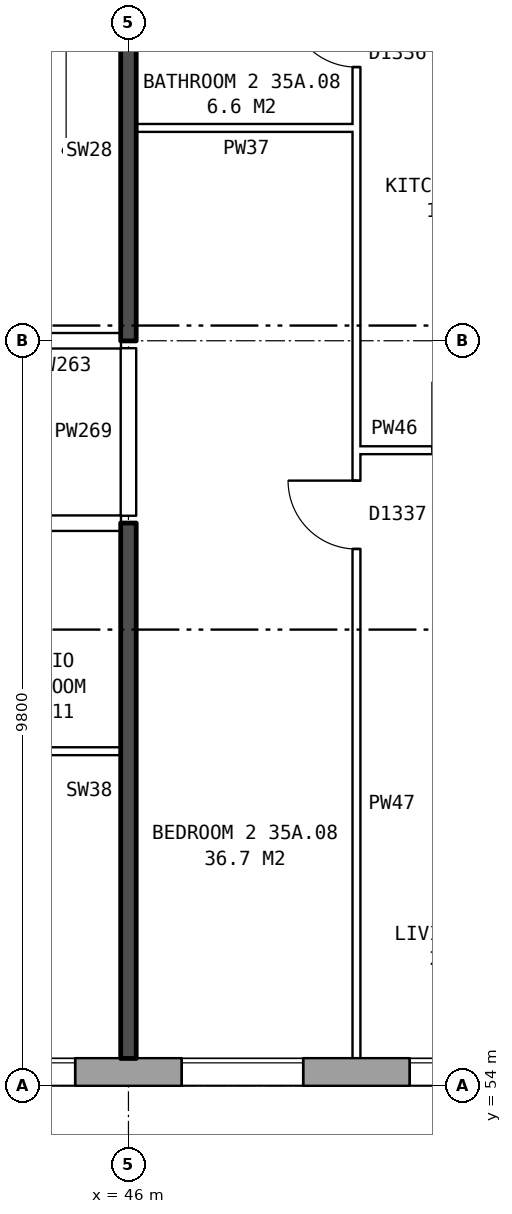
"""IFC4 building model, lengths in metres.
Left out: names, types, materials, properties, quantities, classifications, styles, units other than length and angle.
Written with IfcOpenShell. Run it as: python <this file> out.ifc"""

import sys

from ifc_helpers import new_model, si_unit, direction, frame, frame_2d, origin, place, context, subcontext, project, spatial, rectangle, extrude, element, fill, save


model = new_model("IFC4")
c1 = context("Model", 3, precision=1e-05, world=origin(), true_north=direction((0.0, 1.0)))
c2 = subcontext(c1, "Body", "Model", "MODEL_VIEW")
j1 = project(units=[si_unit("LENGTHUNIT", "METRE"), si_unit("PLANEANGLEUNIT", "RADIAN")], contexts=[c1])
p1 = place(None, origin())
s1 = spatial("IfcSite", under=j1, at=p1, CompositionType="ELEMENT")
p2 = place(p1, origin())
s2 = spatial("IfcBuilding", under=s1, at=p2, CompositionType="ELEMENT")
p3 = place(p2, frame((0.0, 0.0, 126.8)))
s3 = spatial("IfcBuildingStorey", under=s2, at=p3, CompositionType="ELEMENT", Elevation=126.8)
p4 = place(p3, frame((29.825, 54.18, 0.0), z_axis=(0.0, 0.0, 1.0), x_axis=(1.0, 0.0, 0.0)))
e1 = element("IfcWall", 1, at=p4, inside=s3, PredefinedType="STANDARD", context=c2, shape_type="SweptSolid", body=[
    extrude(rectangle(XDim=43.101, YDim=0.36, at=frame_2d((21.55, 0.0))), origin(), (0.0, 0.0, 1.0), 2.85),
])
p5 = place(p4, frame((1.875, 0.0, 0.8)))
e2 = element("IfcOpeningElement", 2, at=p5, cuts=e1, PredefinedType="OPENING", context=c2, shape_type="SweptSolid", body=[
    extrude(rectangle(XDim=1.6, YDim=1.8, at=frame_2d((0.8, 0.9))), frame((0.0, 0.19, 0.0), z_axis=(0.0, -1.0, 0.0), x_axis=(1.0, 0.0, 0.0)), (0.0, 0.0, 1.0), 0.38),
])
p6 = place(p4, frame((4.375, 0.0, 0.8)))
e3 = element("IfcOpeningElement", 3, at=p6, cuts=e1, PredefinedType="OPENING", context=c2, shape_type="SweptSolid", body=[
    extrude(rectangle(XDim=1.0, YDim=1.8, at=frame_2d((0.5, 0.9))), frame((0.0, 0.19, 0.0), z_axis=(0.0, -1.0, 0.0), x_axis=(1.0, 0.0, 0.0)), (0.0, 0.0, 1.0), 0.38),
])
p7 = place(p4, frame((5.675, 0.0, 1.6)))
e4 = element("IfcOpeningElement", 4, at=p7, cuts=e1, PredefinedType="OPENING", context=c2, shape_type="SweptSolid", body=[
    extrude(rectangle(XDim=0.6, YDim=0.9, at=frame_2d((0.3, 0.45))), frame((0.0, 0.19, 0.0), z_axis=(0.0, -1.0, 0.0), x_axis=(1.0, 0.0, 0.0)), (0.0, 0.0, 1.0), 0.38),
])
p8 = place(p4, frame((10.875, 0.0, 0.8)))
e5 = element("IfcOpeningElement", 5, at=p8, cuts=e1, PredefinedType="OPENING", context=c2, shape_type="SweptSolid", body=[
    extrude(rectangle(XDim=1.6, YDim=1.8, at=frame_2d((0.8, 0.9))), frame((0.0, 0.19, 0.0), z_axis=(0.0, -1.0, 0.0), x_axis=(1.0, 0.0, 0.0)), (0.0, 0.0, 1.0), 0.38),
])
p9 = place(p4, frame((13.875, 0.0, 0.8)))
e6 = element("IfcOpeningElement", 6, at=p9, cuts=e1, PredefinedType="OPENING", context=c2, shape_type="SweptSolid", body=[
    extrude(rectangle(XDim=1.6, YDim=1.8, at=frame_2d((0.8, 0.9))), frame((0.0, 0.19, 0.0), z_axis=(0.0, -1.0, 0.0), x_axis=(1.0, 0.0, 0.0)), (0.0, 0.0, 1.0), 0.38),
])
p10 = place(p4, frame((16.875, 0.0, 0.8)))
e7 = element("IfcOpeningElement", 7, at=p10, cuts=e1, PredefinedType="OPENING", context=c2, shape_type="SweptSolid", body=[
    extrude(rectangle(XDim=1.6, YDim=1.8, at=frame_2d((0.8, 0.9))), frame((0.0, 0.19, 0.0), z_axis=(0.0, -1.0, 0.0), x_axis=(1.0, 0.0, 0.0)), (0.0, 0.0, 1.0), 0.38),
])
p11 = place(p4, frame((19.875, 0.0, 0.8)))
e8 = element("IfcOpeningElement", 8, at=p11, cuts=e1, PredefinedType="OPENING", context=c2, shape_type="SweptSolid", body=[
    extrude(rectangle(XDim=1.6, YDim=1.8, at=frame_2d((0.8, 0.9))), frame((0.0, 0.19, 0.0), z_axis=(0.0, -1.0, 0.0), x_axis=(1.0, 0.0, 0.0)), (0.0, 0.0, 1.0), 0.38),
])
p12 = place(p4, frame((22.875, 0.0, 0.8)))
e9 = element("IfcOpeningElement", 9, at=p12, cuts=e1, PredefinedType="OPENING", context=c2, shape_type="SweptSolid", body=[
    extrude(rectangle(XDim=1.6, YDim=1.8, at=frame_2d((0.8, 0.9))), frame((0.0, 0.19, 0.0), z_axis=(0.0, -1.0, 0.0), x_axis=(1.0, 0.0, 0.0)), (0.0, 0.0, 1.0), 0.38),
])
p13 = place(p4, frame((25.875, 0.0, 0.8)))
e10 = element("IfcOpeningElement", 10, at=p13, cuts=e1, PredefinedType="OPENING", context=c2, shape_type="SweptSolid", body=[
    extrude(rectangle(XDim=1.6, YDim=1.8, at=frame_2d((0.8, 0.9))), frame((0.0, 0.19, 0.0), z_axis=(0.0, -1.0, 0.0), x_axis=(1.0, 0.0, 0.0)), (0.0, 0.0, 1.0), 0.38),
])
p14 = place(p4, frame((28.875, 0.0, 0.8)))
e11 = element("IfcOpeningElement", 11, at=p14, cuts=e1, PredefinedType="OPENING", context=c2, shape_type="SweptSolid", body=[
    extrude(rectangle(XDim=1.6, YDim=1.8, at=frame_2d((0.8, 0.9))), frame((0.0, 0.19, 0.0), z_axis=(0.0, -1.0, 0.0), x_axis=(1.0, 0.0, 0.0)), (0.0, 0.0, 1.0), 0.38),
])
p15 = place(p4, frame((31.875, 0.0, 0.8)))
e12 = element("IfcOpeningElement", 12, at=p15, cuts=e1, PredefinedType="OPENING", context=c2, shape_type="SweptSolid", body=[
    extrude(rectangle(XDim=1.6, YDim=1.8, at=frame_2d((0.8, 0.9))), frame((0.0, 0.19, 0.0), z_axis=(0.0, -1.0, 0.0), x_axis=(1.0, 0.0, 0.0)), (0.0, 0.0, 1.0), 0.38),
])
p16 = place(p4, frame((34.375, 0.0, 0.8)))
e13 = element("IfcOpeningElement", 13, at=p16, cuts=e1, PredefinedType="OPENING", context=c2, shape_type="SweptSolid", body=[
    extrude(rectangle(XDim=1.2, YDim=0.9, at=frame_2d((0.6, 0.45))), frame((0.0, 0.19, 0.0), z_axis=(0.0, -1.0, 0.0), x_axis=(1.0, 0.0, 0.0)), (0.0, 0.0, 1.0), 0.38),
])
p17 = place(p4, frame((37.875, 0.0, 0.8)))
e14 = element("IfcOpeningElement", 14, at=p17, cuts=e1, PredefinedType="OPENING", context=c2, shape_type="SweptSolid", body=[
    extrude(rectangle(XDim=1.6, YDim=1.8, at=frame_2d((0.8, 0.9))), frame((0.0, 0.19, 0.0), z_axis=(0.0, -1.0, 0.0), x_axis=(1.0, 0.0, 0.0)), (0.0, 0.0, 1.0), 0.38),
])
p18 = place(p4, frame((40.875, 0.0, 0.8)))
e15 = element("IfcOpeningElement", 15, at=p18, cuts=e1, PredefinedType="OPENING", context=c2, shape_type="SweptSolid", body=[
    extrude(rectangle(XDim=1.6, YDim=1.8, at=frame_2d((0.8, 0.9))), frame((0.0, 0.19, 0.0), z_axis=(0.0, -1.0, 0.0), x_axis=(1.0, 0.0, 0.0)), (0.0, 0.0, 1.0), 0.38),
])
p19 = place(p4, frame((7.525, 0.0, 0.8)))
e16 = element("IfcOpeningElement", 16, at=p19, cuts=e1, PredefinedType="OPENING", context=c2, shape_type="SweptSolid", body=[
    extrude(rectangle(XDim=0.6, YDim=0.9, at=frame_2d((0.3, 0.45))), frame((0.0, 0.19, 0.0), z_axis=(0.0, -1.0, 0.0), x_axis=(1.0, 0.0, 0.0)), (0.0, 0.0, 1.0), 0.38),
])
p20 = place(p4, frame((8.525, 0.0, 0.8)))
e17 = element("IfcOpeningElement", 17, at=p20, cuts=e1, PredefinedType="OPENING", context=c2, shape_type="SweptSolid", body=[
    extrude(rectangle(XDim=1.4, YDim=1.8, at=frame_2d((0.7, 0.9))), frame((0.0, 0.19, 0.0), z_axis=(0.0, -1.0, 0.0), x_axis=(1.0, 0.0, 0.0)), (0.0, 0.0, 1.0), 0.38),
])
p21 = place(p4, frame((36.725, 0.0, 1.7)))
e18 = element("IfcOpeningElement", 18, at=p21, cuts=e1, PredefinedType="OPENING", context=c2, shape_type="SweptSolid", body=[
    extrude(rectangle(XDim=0.8, YDim=0.9, at=frame_2d((0.4, 0.45))), frame((0.0, 0.19, 0.0), z_axis=(0.0, -1.0, 0.0), x_axis=(1.0, 0.0, 0.0)), (0.0, 0.0, 1.0), 0.38),
])
p22 = place(p3, frame((43.6, 58.4, 0.0), z_axis=(0.0, 0.0, 1.0), x_axis=(1.0, 0.0, 0.0)))
e19 = element("IfcWall", 19, at=p22, inside=s3, PredefinedType="PARTITIONING", context=c2, shape_type="SweptSolid", body=[
    extrude(rectangle(XDim=2.3, YDim=0.1, at=frame_2d((1.15, 0.0))), origin(), (0.0, 0.0, 1.0), 2.85),
])
p23 = place(p3, frame((27.11, 61.4, 0.0), z_axis=(0.0, 0.0, 1.0), x_axis=(1.0, 0.0, 0.0)))
e20 = element("IfcWall", 20, at=p23, inside=s3, PredefinedType="PARTITIONING", context=c2, shape_type="SweptSolid", body=[
    extrude(rectangle(XDim=18.79, YDim=0.2, at=frame_2d((9.395, 0.0))), origin(), (0.0, 0.0, 1.0), 2.85),
])
p24 = place(p23, frame((14.19, 0.0, 0.0)))
e21 = element("IfcOpeningElement", 21, at=p24, cuts=e20, PredefinedType="OPENING", context=c2, shape_type="SweptSolid", body=[
    extrude(rectangle(XDim=1.0, YDim=2.1, at=frame_2d((0.5, 1.05))), frame((0.0, 0.11, 0.0), z_axis=(0.0, -1.0, 0.0), x_axis=(1.0, 0.0, 0.0)), (0.0, 0.0, 1.0), 0.22),
])
p25 = place(p23, frame((8.19, 0.0, 0.0)))
e22 = element("IfcOpeningElement", 22, at=p25, cuts=e20, PredefinedType="OPENING", context=c2, shape_type="SweptSolid", body=[
    extrude(rectangle(XDim=1.0, YDim=2.1, at=frame_2d((0.5, 1.05))), frame((0.0, 0.11, 0.0), z_axis=(0.0, -1.0, 0.0), x_axis=(1.0, 0.0, 0.0)), (0.0, 0.0, 1.0), 0.22),
])
p26 = place(p23, frame((1.745, 0.0, 0.0)))
e23 = element("IfcOpeningElement", 23, at=p26, cuts=e20, PredefinedType="OPENING", context=c2, shape_type="SweptSolid", body=[
    extrude(rectangle(XDim=1.0, YDim=2.1, at=frame_2d((0.5, 1.05))), frame((0.0, 0.11, 0.0), z_axis=(0.0, -1.0, 0.0), x_axis=(1.0, 0.0, 0.0)), (0.0, 0.0, 1.0), 0.22),
])
p27 = place(p3, frame((49.0, 62.36, 0.0), z_axis=(0.0, 0.0, 1.0), x_axis=(1.0, 0.0, 0.0)))
e24 = element("IfcWall", 24, at=p27, inside=s3, PredefinedType="PARTITIONING", context=c2, shape_type="SweptSolid", body=[
    extrude(rectangle(XDim=2.9, YDim=0.1, at=frame_2d((1.45, 0.0))), origin(), (0.0, 0.0, 1.0), 2.85),
])
p28 = place(p27, frame((1.0, 0.0, 0.0)))
e25 = element("IfcOpeningElement", 25, at=p28, cuts=e24, PredefinedType="OPENING", context=c2, shape_type="SweptSolid", body=[
    extrude(rectangle(XDim=0.9, YDim=2.1, at=frame_2d((0.45, 1.05))), frame((0.0, 0.06, 0.0), z_axis=(0.0, -1.0, 0.0), x_axis=(1.0, 0.0, 0.0)), (0.0, 0.0, 1.0), 0.12),
])
p29 = place(p3, frame((44.36, 63.8, 0.0), z_axis=(0.0, 0.0, 1.0), x_axis=(1.0, 0.0, 0.0)))
e26 = element("IfcWall", 26, at=p29, inside=s3, PredefinedType="PARTITIONING", context=c2, shape_type="SweptSolid", body=[
    extrude(rectangle(XDim=1.54, YDim=0.2, at=frame_2d((0.77, 0.0))), origin(), (0.0, 0.0, 1.0), 2.85),
])
p30 = place(p3, frame((46.1, 66.6, 0.0), z_axis=(0.0, 0.0, 1.0), x_axis=(1.0, 0.0, 0.0)))
e27 = element("IfcWall", 27, at=p30, inside=s3, PredefinedType="PARTITIONING", context=c2, shape_type="SweptSolid", body=[
    extrude(rectangle(XDim=2.9, YDim=0.1, at=frame_2d((1.45, 0.0))), origin(), (0.0, 0.0, 1.0), 2.85),
])
p31 = place(p3, frame((46.0, 54.36, 0.0), z_axis=(0.0, 0.0, 1.0), x_axis=(0.0, 1.0, 0.0)))
e28 = element("IfcWall", 28, at=p31, inside=s3, PredefinedType="SOLIDWALL", context=c2, shape_type="SweptSolid", body=[
    extrude(rectangle(XDim=7.04, YDim=0.2, at=frame_2d((3.52, 0.0))), origin(), (0.0, 0.0, 1.0), 2.85),
])
p32 = place(p3, frame((46.0, 61.5, 0.0), z_axis=(0.0, 0.0, 1.0), x_axis=(0.0, 1.0, 0.0)))
e29 = element("IfcWall", 29, at=p32, inside=s3, PredefinedType="PARTITIONING", context=c2, shape_type="SweptSolid", body=[
    extrude(rectangle(XDim=2.2, YDim=0.2, at=frame_2d((1.1, 0.0))), origin(), (0.0, 0.0, 1.0), 2.85),
])
p33 = place(p3, frame((46.0, 63.8, 0.0), z_axis=(0.0, 0.0, 1.0), x_axis=(0.0, 1.0, 0.0)))
e30 = element("IfcWall", 30, at=p33, inside=s3, PredefinedType="SOLIDWALL", context=c2, shape_type="SweptSolid", body=[
    extrude(rectangle(XDim=5.0, YDim=0.2, at=frame_2d((2.5, 0.0))), origin(), (0.0, 0.0, 1.0), 2.85),
])
p34 = place(p3, frame((49.0, 54.36, 0.0), z_axis=(0.0, 0.0, 1.0), x_axis=(0.0, 1.0, 0.0)))
e31 = element("IfcWall", 31, at=p34, inside=s3, PredefinedType="PARTITIONING", context=c2, shape_type="SweptSolid", body=[
    extrude(rectangle(XDim=14.34, YDim=0.1, at=frame_2d((7.17, 0.0))), origin(), (0.0, 0.0, 1.0), 2.85),
])
p35 = place(p34, frame((6.7, 0.0, 0.0)))
e32 = element("IfcOpeningElement", 32, at=p35, cuts=e31, PredefinedType="OPENING", context=c2, shape_type="SweptSolid", body=[
    extrude(rectangle(XDim=0.9, YDim=2.1, at=frame_2d((0.45, 1.05))), frame((0.0, 0.06, 0.0), z_axis=(0.0, -1.0, 0.0), x_axis=(1.0, 0.0, 0.0)), (0.0, 0.0, 1.0), 0.12),
])
p36 = place(p34, frame((13.04, 0.0, 0.0)))
e33 = element("IfcOpeningElement", 33, at=p36, cuts=e31, PredefinedType="OPENING", context=c2, shape_type="SweptSolid", body=[
    extrude(rectangle(XDim=0.9, YDim=2.1, at=frame_2d((0.45, 1.05))), frame((0.0, 0.06, 0.0), z_axis=(0.0, -1.0, 0.0), x_axis=(1.0, 0.0, 0.0)), (0.0, 0.0, 1.0), 0.12),
])
p37 = place(p9, origin())
e34 = element("IfcWindow", 34, at=p37, inside=s3, PartitioningType="SINGLE_PANEL", PredefinedType="WINDOW", context=c2, shape_type="SweptSolid", body=[
    extrude(rectangle(XDim=1.6, YDim=1.8, at=frame_2d((0.8, 0.9))), frame((0.0, 0.15, 0.0), z_axis=(0.0, -1.0, 0.0), x_axis=(1.0, 0.0, 0.0)), (0.0, 0.0, 1.0), 0.06),
])
fill(e6, e34)
p38 = place(p10, origin())
e35 = element("IfcWindow", 35, at=p38, inside=s3, PartitioningType="SINGLE_PANEL", PredefinedType="WINDOW", context=c2, shape_type="SweptSolid", body=[
    extrude(rectangle(XDim=1.6, YDim=1.8, at=frame_2d((0.8, 0.9))), frame((0.0, 0.15, 0.0), z_axis=(0.0, -1.0, 0.0), x_axis=(1.0, 0.0, 0.0)), (0.0, 0.0, 1.0), 0.06),
])
fill(e7, e35)
p39 = place(p11, origin())
e36 = element("IfcWindow", 36, at=p39, inside=s3, PartitioningType="SINGLE_PANEL", PredefinedType="WINDOW", context=c2, shape_type="SweptSolid", body=[
    extrude(rectangle(XDim=1.6, YDim=1.8, at=frame_2d((0.8, 0.9))), frame((0.0, 0.15, 0.0), z_axis=(0.0, -1.0, 0.0), x_axis=(1.0, 0.0, 0.0)), (0.0, 0.0, 1.0), 0.06),
])
fill(e8, e36)
p40 = place(p35, origin())
e37 = element("IfcDoor", 37, at=p40, inside=s3, OperationType="SINGLE_SWING_RIGHT", PredefinedType="DOOR", context=c2, shape_type="SweptSolid", body=[
    extrude(rectangle(XDim=0.9, YDim=2.1, at=frame_2d((0.45, 1.05))), frame((0.0, 0.025, 0.0), z_axis=(0.0, -1.0, 0.0), x_axis=(1.0, 0.0, 0.0)), (0.0, 0.0, 1.0), 0.05),
])
fill(e32, e37)
p41 = place(p36, origin())
e38 = element("IfcDoor", 38, at=p41, inside=s3, OperationType="SINGLE_SWING_RIGHT", PredefinedType="DOOR", context=c2, shape_type="SweptSolid", body=[
    extrude(rectangle(XDim=0.9, YDim=2.1, at=frame_2d((0.45, 1.05))), frame((0.0, 0.025, 0.0), z_axis=(0.0, -1.0, 0.0), x_axis=(1.0, 0.0, 0.0)), (0.0, 0.0, 1.0), 0.05),
])
fill(e33, e38)
save(model, sys.argv[1])
